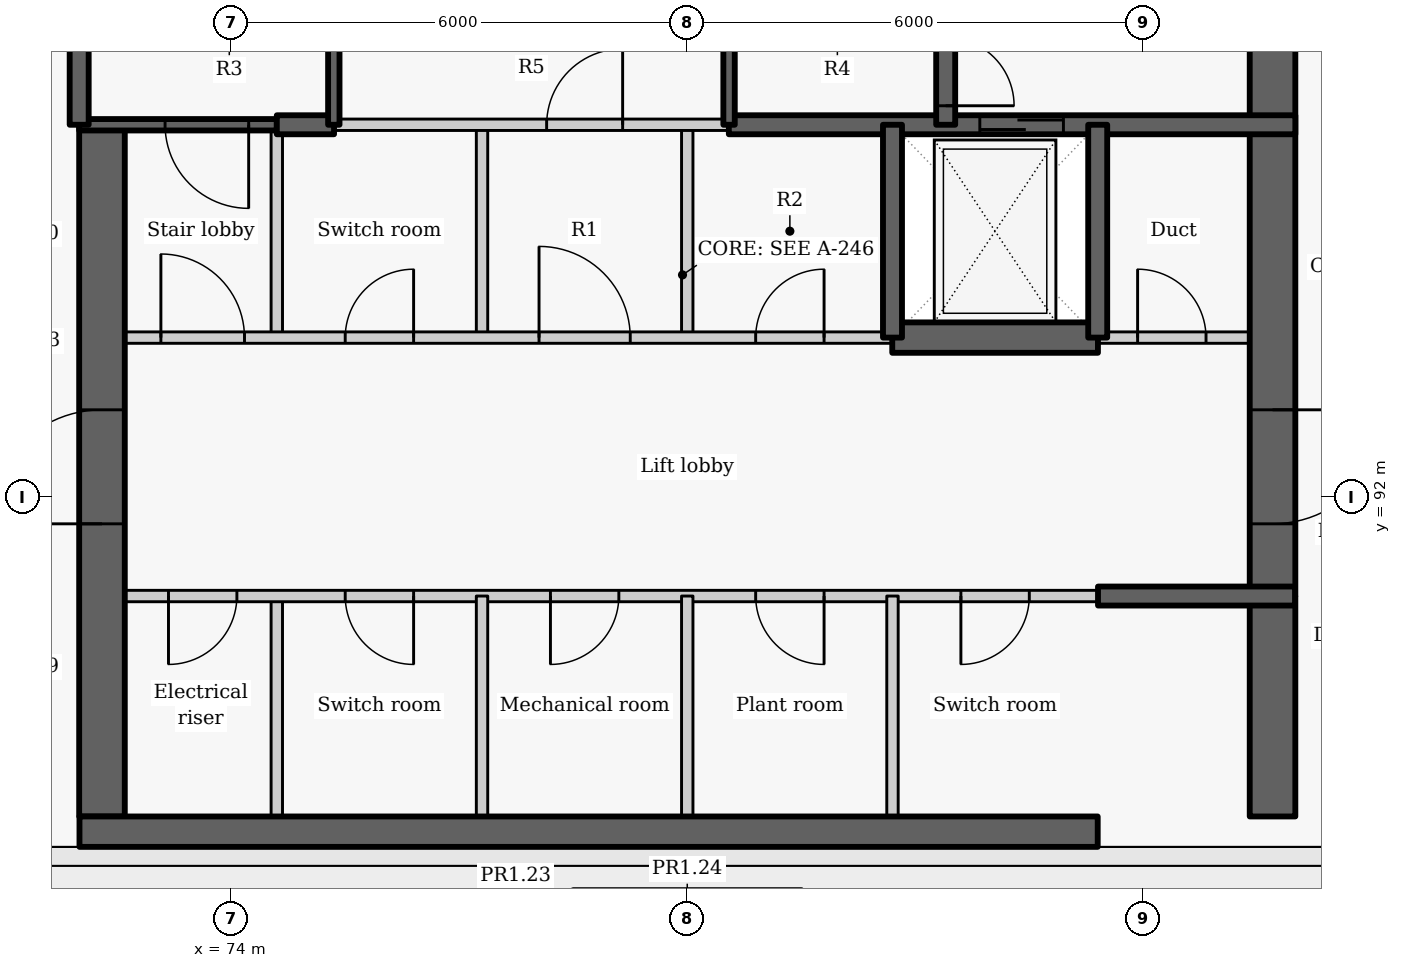
"""IFC4 building model, lengths in metres.
Left out: names, types, materials, properties, quantities, classifications, styles, units other than length and angle.
Written with IfcOpenShell. Run it as: python <this file> out.ifc"""

import sys

from ifc_helpers import new_model, si_unit, direction, frame, frame_2d, origin, place, context, subcontext, project, spatial, rectangle, extrude, element, fill, save


model = new_model("IFC4")
c1 = context("Model", 3, precision=1e-05, world=origin(), true_north=direction((0.0, 1.0)))
c2 = subcontext(c1, "Body", "Model", "MODEL_VIEW")
j1 = project(units=[si_unit("LENGTHUNIT", "METRE"), si_unit("PLANEANGLEUNIT", "RADIAN")], contexts=[c1])
p1 = place(None, origin())
s1 = spatial("IfcSite", under=j1, at=p1, CompositionType="ELEMENT")
p2 = place(p1, origin())
s2 = spatial("IfcBuilding", under=s1, at=p2, CompositionType="ELEMENT")
p3 = place(p2, frame((0.0, 0.0, 276.0)))
s3 = spatial("IfcBuildingStorey", under=s2, at=p3, CompositionType="ELEMENT", Elevation=276.0)
p4 = place(p3, frame((74.6, 87.8, 0.0), z_axis=(0.0, 0.0, 1.0), x_axis=(0.0, 1.0, 0.0)))
e1 = element("IfcWall", 1, at=p4, inside=s3, PredefinedType="PARTITIONING", context=c2, shape_type="SweptSolid", body=[
    extrude(rectangle(XDim=2.9, YDim=0.15, at=frame_2d((1.45, 0.0))), origin(), (0.0, 0.0, 1.0), 3.325),
])
p5 = place(p3, frame((74.6, 94.1, 0.0), z_axis=(0.0, 0.0, 1.0), x_axis=(0.0, 1.0, 0.0)))
e2 = element("IfcWall", 2, at=p5, inside=s3, PredefinedType="PARTITIONING", context=c2, shape_type="SweptSolid", body=[
    extrude(rectangle(XDim=2.8, YDim=0.15, at=frame_2d((1.4, 0.0))), origin(), (0.0, 0.0, 1.0), 3.325),
])
p6 = place(p3, frame((85.4, 90.7, 0.0), z_axis=(0.0, 0.0, 1.0), x_axis=(-1.0, 0.0, 0.0)))
e3 = element("IfcWall", 3, at=p6, inside=s3, PredefinedType="PARTITIONING", context=c2, shape_type="SweptSolid", body=[
    extrude(rectangle(XDim=13.4, YDim=0.15, at=frame_2d((6.7, 0.0))), origin(), (0.0, 0.0, 1.0), 3.325),
])
p7 = place(p6, frame((11.325, 0.0, 0.0)))
e4 = element("IfcOpeningElement", 4, at=p7, cuts=e3, PredefinedType="OPENING", context=c2, shape_type="SweptSolid", body=[
    extrude(rectangle(XDim=0.9, YDim=2.1, at=frame_2d((0.45, 1.05))), frame((0.0, 0.085, 0.0), z_axis=(0.0, -1.0, 0.0), x_axis=(1.0, 0.0, 0.0)), (0.0, 0.0, 1.0), 0.17),
])
p8 = place(p6, frame((9.0, 0.0, 0.0)))
e5 = element("IfcOpeningElement", 5, at=p8, cuts=e3, PredefinedType="OPENING", context=c2, shape_type="SweptSolid", body=[
    extrude(rectangle(XDim=0.9, YDim=2.1, at=frame_2d((0.45, 1.05))), frame((0.0, 0.085, 0.0), z_axis=(0.0, -1.0, 0.0), x_axis=(1.0, 0.0, 0.0)), (0.0, 0.0, 1.0), 0.17),
])
p9 = place(p6, frame((6.3, 0.0, 0.0)))
e6 = element("IfcOpeningElement", 6, at=p9, cuts=e3, PredefinedType="OPENING", context=c2, shape_type="SweptSolid", body=[
    extrude(rectangle(XDim=0.9, YDim=2.1, at=frame_2d((0.45, 1.05))), frame((0.0, 0.085, 0.0), z_axis=(0.0, -1.0, 0.0), x_axis=(1.0, 0.0, 0.0)), (0.0, 0.0, 1.0), 0.17),
])
p10 = place(p6, frame((3.6, 0.0, 0.0)))
e7 = element("IfcOpeningElement", 7, at=p10, cuts=e3, PredefinedType="OPENING", context=c2, shape_type="SweptSolid", body=[
    extrude(rectangle(XDim=0.9, YDim=2.1, at=frame_2d((0.45, 1.05))), frame((0.0, 0.085, 0.0), z_axis=(0.0, -1.0, 0.0), x_axis=(1.0, 0.0, 0.0)), (0.0, 0.0, 1.0), 0.17),
])
p11 = place(p6, frame((0.9, 0.0, 0.0)))
e8 = element("IfcOpeningElement", 8, at=p11, cuts=e3, PredefinedType="OPENING", context=c2, shape_type="SweptSolid", body=[
    extrude(rectangle(XDim=0.9, YDim=2.1, at=frame_2d((0.45, 1.05))), frame((0.0, 0.085, 0.0), z_axis=(0.0, -1.0, 0.0), x_axis=(1.0, 0.0, 0.0)), (0.0, 0.0, 1.0), 0.17),
])
p12 = place(p3, frame((72.3, 87.8, -0.275), z_axis=(0.0, 0.0, 1.0), x_axis=(0.0, 1.0, 0.0)))
e9 = element("IfcWall", 9, at=p12, inside=s3, PredefinedType="SHEAR", context=c2, shape_type="SweptSolid", body=[
    extrude(rectangle(XDim=9.1, YDim=0.6, at=frame_2d((4.55, 0.0))), origin(), (0.0, 0.0, 1.0), 3.6),
])
p13 = place(p12, frame((3.85, 0.0, 0.275)))
e10 = element("IfcOpeningElement", 10, at=p13, cuts=e9, PredefinedType="OPENING", context=c2, shape_type="SweptSolid", body=[
    extrude(rectangle(XDim=1.5, YDim=2.1, at=frame_2d((0.75, 1.05))), frame((0.0, 0.31, 0.0), z_axis=(0.0, -1.0, 0.0), x_axis=(1.0, 0.0, 0.0)), (0.0, 0.0, 1.0), 0.62),
])
p14 = place(p3, frame((77.3, 87.8, 0.0), z_axis=(0.0, 0.0, 1.0), x_axis=(0.0, 1.0, 0.0)))
e11 = element("IfcWall", 11, at=p14, inside=s3, PredefinedType="PARTITIONING", context=c2, shape_type="SweptSolid", body=[
    extrude(rectangle(XDim=2.9, YDim=0.15, at=frame_2d((1.45, 0.0))), origin(), (0.0, 0.0, 1.0), 3.325),
])
p15 = place(p3, frame((77.3, 94.1, 0.0), z_axis=(0.0, 0.0, 1.0), x_axis=(0.0, 1.0, 0.0)))
e12 = element("IfcWall", 12, at=p15, inside=s3, PredefinedType="PARTITIONING", context=c2, shape_type="SweptSolid", body=[
    extrude(rectangle(XDim=2.8, YDim=0.15, at=frame_2d((1.4, 0.0))), origin(), (0.0, 0.0, 1.0), 3.325),
])
p16 = place(p3, frame((80.0, 87.8, 0.0), z_axis=(0.0, 0.0, 1.0), x_axis=(0.0, 1.0, 0.0)))
e13 = element("IfcWall", 13, at=p16, inside=s3, PredefinedType="PARTITIONING", context=c2, shape_type="SweptSolid", body=[
    extrude(rectangle(XDim=2.9, YDim=0.15, at=frame_2d((1.45, 0.0))), origin(), (0.0, 0.0, 1.0), 3.325),
])
p17 = place(p3, frame((80.0, 94.1, 0.0), z_axis=(0.0, 0.0, 1.0), x_axis=(0.0, 1.0, 0.0)))
e14 = element("IfcWall", 14, at=p17, inside=s3, PredefinedType="PARTITIONING", context=c2, shape_type="SweptSolid", body=[
    extrude(rectangle(XDim=2.8, YDim=0.15, at=frame_2d((1.4, 0.0))), origin(), (0.0, 0.0, 1.0), 3.325),
])
p18 = place(p3, frame((82.7, 87.8, 0.0), z_axis=(0.0, 0.0, 1.0), x_axis=(0.0, 1.0, 0.0)))
e15 = element("IfcWall", 15, at=p18, inside=s3, PredefinedType="PARTITIONING", context=c2, shape_type="SweptSolid", body=[
    extrude(rectangle(XDim=2.9, YDim=0.15, at=frame_2d((1.45, 0.0))), origin(), (0.0, 0.0, 1.0), 3.325),
])
p19 = place(p3, frame((72.0, 94.1, 0.0), z_axis=(0.0, 0.0, 1.0), x_axis=(1.0, 0.0, 0.0)))
e16 = element("IfcWall", 16, at=p19, inside=s3, PredefinedType="PARTITIONING", context=c2, shape_type="SweptSolid", body=[
    extrude(rectangle(XDim=10.703, YDim=0.15, at=frame_2d((5.352, 0.0))), origin(), (0.0, 0.0, 1.0), 3.325),
])
p20 = place(p19, frame((1.075, 0.0, 0.0)))
e17 = element("IfcOpeningElement", 17, at=p20, cuts=e16, PredefinedType="OPENING", context=c2, shape_type="SweptSolid", body=[
    extrude(rectangle(XDim=1.1, YDim=2.1, at=frame_2d((0.55, 1.05))), frame((0.0, 0.085, 0.0), z_axis=(0.0, -1.0, 0.0), x_axis=(1.0, 0.0, 0.0)), (0.0, 0.0, 1.0), 0.17),
])
p21 = place(p19, frame((3.5, 0.0, 0.0)))
e18 = element("IfcOpeningElement", 18, at=p21, cuts=e16, PredefinedType="OPENING", context=c2, shape_type="SweptSolid", body=[
    extrude(rectangle(XDim=0.9, YDim=2.1, at=frame_2d((0.45, 1.05))), frame((0.0, 0.085, 0.0), z_axis=(0.0, -1.0, 0.0), x_axis=(1.0, 0.0, 0.0)), (0.0, 0.0, 1.0), 0.17),
])
p22 = place(p19, frame((6.05, 0.0, 0.0)))
e19 = element("IfcOpeningElement", 19, at=p22, cuts=e16, PredefinedType="OPENING", context=c2, shape_type="SweptSolid", body=[
    extrude(rectangle(XDim=1.2, YDim=2.1, at=frame_2d((0.6, 1.05))), frame((0.0, 0.085, 0.0), z_axis=(0.0, -1.0, 0.0), x_axis=(1.0, 0.0, 0.0)), (0.0, 0.0, 1.0), 0.17),
])
p23 = place(p19, frame((8.9, 0.0, 0.0)))
e20 = element("IfcOpeningElement", 20, at=p23, cuts=e16, PredefinedType="OPENING", context=c2, shape_type="SweptSolid", body=[
    extrude(rectangle(XDim=0.9, YDim=2.1, at=frame_2d((0.45, 1.05))), frame((0.0, 0.085, 0.0), z_axis=(0.0, -1.0, 0.0), x_axis=(1.0, 0.0, 0.0)), (0.0, 0.0, 1.0), 0.17),
])
p24 = place(p3, frame((85.397, 94.1, 0.0), z_axis=(0.0, 0.0, 1.0), x_axis=(1.0, 0.0, 0.0)))
e21 = element("IfcWall", 21, at=p24, inside=s3, PredefinedType="PARTITIONING", context=c2, shape_type="SweptSolid", body=[
    extrude(rectangle(XDim=2.603, YDim=0.15, at=frame_2d((1.302, 0.0))), origin(), (0.0, 0.0, 1.0), 3.325),
])
p25 = place(p24, frame((0.528, 0.0, 0.0)))
e22 = element("IfcOpeningElement", 22, at=p25, cuts=e21, PredefinedType="OPENING", context=c2, shape_type="SweptSolid", body=[
    extrude(rectangle(XDim=0.9, YDim=2.1, at=frame_2d((0.45, 1.05))), frame((0.0, 0.085, 0.0), z_axis=(0.0, -1.0, 0.0), x_axis=(1.0, 0.0, 0.0)), (0.0, 0.0, 1.0), 0.17),
])
p26 = place(p3, frame((82.697, 94.1, -0.275), z_axis=(0.0, 0.0, 1.0), x_axis=(1.0, 0.0, 0.0)))
e23 = element("IfcWall", 23, at=p26, inside=s3, PredefinedType="SHEAR", context=c2, shape_type="SweptSolid", body=[
    extrude(rectangle(XDim=2.706, YDim=0.4, at=frame_2d((1.353, 0.0))), origin(), (0.0, 0.0, 1.0), 3.6),
])
p27 = place(p3, frame((87.7, 102.05, -0.275), z_axis=(0.0, 0.0, 1.0), x_axis=(0.0, -1.0, 0.0)))
e24 = element("IfcWall", 24, at=p27, inside=s3, PredefinedType="SHEAR", context=c2, shape_type="SweptSolid", body=[
    extrude(rectangle(XDim=11.35, YDim=0.6, at=frame_2d((5.675, 0.0))), origin(), (0.0, 0.0, 1.0), 3.6),
])
p28 = place(p27, frame((8.9, 0.0, 0.275)))
e25 = element("IfcOpeningElement", 25, at=p28, cuts=e24, PredefinedType="OPENING", context=c2, shape_type="SweptSolid", body=[
    extrude(rectangle(XDim=1.5, YDim=2.1, at=frame_2d((0.75, 1.05))), frame((0.0, 0.31, 0.0), z_axis=(0.0, -1.0, 0.0), x_axis=(1.0, 0.0, 0.0)), (0.0, 0.0, 1.0), 0.62),
])
p29 = place(p27, frame((2.025, 0.0, 0.275)))
e26 = element("IfcOpeningElement", 26, at=p29, cuts=e24, PredefinedType="OPENING", context=c2, shape_type="SweptSolid", body=[
    extrude(rectangle(XDim=1.1, YDim=2.1, at=frame_2d((0.55, 1.05))), frame((0.0, 0.31, 0.0), z_axis=(0.0, -1.0, 0.0), x_axis=(1.0, 0.0, 0.0)), (0.0, 0.0, 1.0), 0.62),
])
p30 = place(p3, frame((74.6, 96.9, -0.275), z_axis=(0.0, 0.0, 1.0), x_axis=(-1.0, 0.0, 0.0)))
e27 = element("IfcWall", 27, at=p30, inside=s3, PredefinedType="SHEAR", context=c2, shape_type="SweptSolid", body=[
    extrude(rectangle(XDim=2.6, YDim=0.15, at=frame_2d((1.3, 0.0))), origin(), (0.0, 0.0, 1.0), 3.6),
])
p31 = place(p30, frame((0.37, 0.0, 0.275)))
e28 = element("IfcOpeningElement", 28, at=p31, cuts=e27, PredefinedType="OPENING", context=c2, shape_type="SweptSolid", body=[
    extrude(rectangle(XDim=1.1, YDim=2.1, at=frame_2d((0.55, 1.05))), frame((0.0, 0.085, 0.0), z_axis=(0.0, -1.0, 0.0), x_axis=(1.0, 0.0, 0.0)), (0.0, 0.0, 1.0), 0.17),
])
p32 = place(p3, frame((74.6, 96.9, -0.275), z_axis=(0.0, 0.0, 1.0), x_axis=(1.0, 0.0, 0.0)))
e29 = element("IfcWall", 29, at=p32, inside=s3, PredefinedType="SHEAR", context=c2, shape_type="SweptSolid", body=[
    extrude(rectangle(XDim=0.753, YDim=0.25, at=frame_2d((0.376, 0.0))), origin(), (0.0, 0.0, 1.0), 3.6),
])
p33 = place(p3, frame((80.547, 96.9, -0.275), z_axis=(0.0, 0.0, 1.0), x_axis=(1.0, 0.0, 0.0)))
e30 = element("IfcWall", 30, at=p33, inside=s3, PredefinedType="SHEAR", context=c2, shape_type="SweptSolid", body=[
    extrude(rectangle(XDim=7.453, YDim=0.25, at=frame_2d((3.727, 0.0))), origin(), (0.0, 0.0, 1.0), 3.6),
])
p34 = place(p33, frame((3.302, 0.0, 0.275)))
e31 = element("IfcOpeningElement", 31, at=p34, cuts=e30, PredefinedType="OPENING", context=c2, shape_type="SweptSolid", body=[
    extrude(rectangle(XDim=1.1, YDim=2.1, at=frame_2d((0.55, 1.05))), frame((0.0, 0.135, 0.0), z_axis=(0.0, -1.0, 0.0), x_axis=(1.0, 0.0, 0.0)), (0.0, 0.0, 1.0), 0.27),
])
p35 = place(p3, frame((75.347, 96.9, 0.0), z_axis=(0.0, 0.0, 1.0), x_axis=(1.0, 0.0, 0.0)))
e32 = element("IfcWall", 32, at=p35, inside=s3, PredefinedType="PARTITIONING", context=c2, shape_type="SweptSolid", body=[
    extrude(rectangle(XDim=5.206, YDim=0.15, at=frame_2d((2.603, 0.0))), origin(), (0.0, 0.0, 1.0), 3.325),
])
p36 = place(p35, frame((2.803, 0.0, 0.0)))
e33 = element("IfcOpeningElement", 33, at=p36, cuts=e32, PredefinedType="OPENING", context=c2, shape_type="SweptSolid", body=[
    extrude(rectangle(XDim=1.0, YDim=2.1, at=frame_2d((0.5, 1.05))), frame((0.0, 0.085, 0.0), z_axis=(0.0, -1.0, 0.0), x_axis=(1.0, 0.0, 0.0)), (0.0, 0.0, 1.0), 0.17),
])
for number, where, z_axis, x_axis in (
    (34, (82.7, 94.1, -0.275), (0.0, 0.0, 1.0), (0.0, 1.0, 0.0)),
    (35, (85.4, 94.1, -0.275), (0.0, 0.0, 1.0), (0.0, 1.0, 0.0)),
):
    element("IfcWall", number, at=place(p3, frame(where, z_axis=z_axis, x_axis=x_axis)), inside=s3, PredefinedType="SHEAR", context=c2, shape_type="SweptSolid", body=[
        extrude(rectangle(XDim=2.8, YDim=0.25, at=frame_2d((1.4, 0.0))), origin(), (0.0, 0.0, 1.0), 3.6),
    ])
p37 = place(p3, frame((75.35, 96.9, -0.275), z_axis=(0.0, 0.0, 1.0), x_axis=(0.0, 1.0, 0.0)))
e36 = element("IfcWall", 36, at=p37, inside=s3, PredefinedType="SHEAR", context=c2, shape_type="SweptSolid", body=[
    extrude(rectangle(XDim=1.503, YDim=0.15, at=frame_2d((0.751, 0.0))), origin(), (0.0, 0.0, 1.0), 3.6),
])
p38 = place(p3, frame((72.0, 96.9, -0.275), z_axis=(0.0, 0.0, 1.0), x_axis=(0.0, 1.0, 0.0)))
e37 = element("IfcWall", 37, at=p38, inside=s3, PredefinedType="SHEAR", context=c2, shape_type="SweptSolid", body=[
    extrude(rectangle(XDim=5.15, YDim=0.25, at=frame_2d((2.575, 0.0))), origin(), (0.0, 0.0, 1.0), 3.6),
])
p39 = place(p3, frame((83.4, 102.05, -0.275), z_axis=(0.0, 0.0, 1.0), x_axis=(0.0, -1.0, 0.0)))
e38 = element("IfcWall", 38, at=p39, inside=s3, PredefinedType="SHEAR", context=c2, shape_type="SweptSolid", body=[
    extrude(rectangle(XDim=5.15, YDim=0.25, at=frame_2d((2.575, 0.0))), origin(), (0.0, 0.0, 1.0), 3.6),
])
p40 = place(p39, frame((4.0, 0.0, 0.275)))
e39 = element("IfcOpeningElement", 39, at=p40, cuts=e38, PredefinedType="OPENING", context=c2, shape_type="SweptSolid", body=[
    extrude(rectangle(XDim=0.9, YDim=2.1, at=frame_2d((0.45, 1.05))), frame((0.0, 0.135, 0.0), z_axis=(0.0, -1.0, 0.0), x_axis=(1.0, 0.0, 0.0)), (0.0, 0.0, 1.0), 0.27),
])
p41 = place(p3, frame((80.55, 96.9, -0.275), z_axis=(0.0, 0.0, 1.0), x_axis=(0.0, 1.0, 0.0)))
e40 = element("IfcWall", 40, at=p41, inside=s3, PredefinedType="SHEAR", context=c2, shape_type="SweptSolid", body=[
    extrude(rectangle(XDim=1.503, YDim=0.15, at=frame_2d((0.751, 0.0))), origin(), (0.0, 0.0, 1.0), 3.6),
])
p42 = place(p3, frame((72.004, 87.6, -0.275), z_axis=(0.0, 0.0, 1.0), x_axis=(1.0, 0.0, 0.0)))
e41 = element("IfcWall", 41, at=p42, inside=s3, PredefinedType="SHEAR", context=c2, shape_type="SweptSolid", body=[
    extrude(rectangle(XDim=13.396, YDim=0.4, at=frame_2d((6.698, 0.0))), origin(), (0.0, 0.0, 1.0), 3.6),
])
p43 = place(p3, frame((87.7, 87.8, -0.275), z_axis=(0.0, 0.0, 1.0), x_axis=(0.0, 1.0, 0.0)))
e42 = element("IfcWall", 42, at=p43, inside=s3, PredefinedType="SHEAR", context=c2, shape_type="SweptSolid", body=[
    extrude(rectangle(XDim=2.896, YDim=0.6, at=frame_2d((1.448, 0.0))), origin(), (0.0, 0.0, 1.0), 3.6),
])
p44 = place(p3, frame((85.404, 90.7, -0.275), z_axis=(0.0, 0.0, 1.0), x_axis=(1.0, 0.0, 0.0)))
e43 = element("IfcWall", 43, at=p44, inside=s3, PredefinedType="SHEAR", context=c2, shape_type="SweptSolid", body=[
    extrude(rectangle(XDim=2.592, YDim=0.25, at=frame_2d((1.296, 0.0))), origin(), (0.0, 0.0, 1.0), 3.6),
])
p45 = place(p7, origin())
e44 = element("IfcDoor", 44, at=p45, inside=s3, OperationType="SINGLE_SWING_RIGHT", PredefinedType="DOOR", context=c2, shape_type="SweptSolid", body=[
    extrude(rectangle(XDim=0.9, YDim=2.1, at=frame_2d((0.45, 1.05))), frame((0.0, 0.025, 0.0), z_axis=(0.0, -1.0, 0.0), x_axis=(1.0, 0.0, 0.0)), (0.0, 0.0, 1.0), 0.05),
])
fill(e4, e44)
p46 = place(p8, origin())
e45 = element("IfcDoor", 45, at=p46, inside=s3, OperationType="SINGLE_SWING_LEFT", PredefinedType="DOOR", context=c2, shape_type="SweptSolid", body=[
    extrude(rectangle(XDim=0.9, YDim=2.1, at=frame_2d((0.45, 1.05))), frame((0.0, 0.025, 0.0), z_axis=(0.0, -1.0, 0.0), x_axis=(1.0, 0.0, 0.0)), (0.0, 0.0, 1.0), 0.05),
])
fill(e5, e45)
p47 = place(p9, origin())
e46 = element("IfcDoor", 46, at=p47, inside=s3, OperationType="SINGLE_SWING_RIGHT", PredefinedType="DOOR", context=c2, shape_type="SweptSolid", body=[
    extrude(rectangle(XDim=0.9, YDim=2.1, at=frame_2d((0.45, 1.05))), frame((0.0, 0.025, 0.0), z_axis=(0.0, -1.0, 0.0), x_axis=(1.0, 0.0, 0.0)), (0.0, 0.0, 1.0), 0.05),
])
fill(e6, e46)
p48 = place(p10, origin())
e47 = element("IfcDoor", 47, at=p48, inside=s3, OperationType="SINGLE_SWING_LEFT", PredefinedType="DOOR", context=c2, shape_type="SweptSolid", body=[
    extrude(rectangle(XDim=0.9, YDim=2.1, at=frame_2d((0.45, 1.05))), frame((0.0, 0.025, 0.0), z_axis=(0.0, -1.0, 0.0), x_axis=(1.0, 0.0, 0.0)), (0.0, 0.0, 1.0), 0.05),
])
fill(e7, e47)
p49 = place(p11, origin())
e48 = element("IfcDoor", 48, at=p49, inside=s3, OperationType="SINGLE_SWING_RIGHT", PredefinedType="DOOR", context=c2, shape_type="SweptSolid", body=[
    extrude(rectangle(XDim=0.9, YDim=2.1, at=frame_2d((0.45, 1.05))), frame((0.0, 0.025, 0.0), z_axis=(0.0, -1.0, 0.0), x_axis=(1.0, 0.0, 0.0)), (0.0, 0.0, 1.0), 0.05),
])
fill(e8, e48)
p50 = place(p20, origin())
e49 = element("IfcDoor", 49, at=p50, inside=s3, OperationType="SINGLE_SWING_LEFT", PredefinedType="DOOR", context=c2, shape_type="SweptSolid", body=[
    extrude(rectangle(XDim=1.1, YDim=2.1, at=frame_2d((0.55, 1.05))), frame((0.0, 0.025, 0.0), z_axis=(0.0, -1.0, 0.0), x_axis=(1.0, 0.0, 0.0)), (0.0, 0.0, 1.0), 0.05),
])
fill(e17, e49)
p51 = place(p21, origin())
e50 = element("IfcDoor", 50, at=p51, inside=s3, OperationType="SINGLE_SWING_RIGHT", PredefinedType="DOOR", context=c2, shape_type="SweptSolid", body=[
    extrude(rectangle(XDim=0.9, YDim=2.1, at=frame_2d((0.45, 1.05))), frame((0.0, 0.025, 0.0), z_axis=(0.0, -1.0, 0.0), x_axis=(1.0, 0.0, 0.0)), (0.0, 0.0, 1.0), 0.05),
])
fill(e18, e50)
p52 = place(p22, origin())
e51 = element("IfcDoor", 51, at=p52, inside=s3, OperationType="DOUBLE_DOOR_SINGLE_SWING", PredefinedType="DOOR", context=c2, shape_type="SweptSolid", body=[
    extrude(rectangle(XDim=1.2, YDim=2.1, at=frame_2d((0.6, 1.05))), frame((0.0, 0.025, 0.0), z_axis=(0.0, -1.0, 0.0), x_axis=(1.0, 0.0, 0.0)), (0.0, 0.0, 1.0), 0.05),
])
fill(e19, e51)
p53 = place(p23, origin())
e52 = element("IfcDoor", 52, at=p53, inside=s3, OperationType="SINGLE_SWING_RIGHT", PredefinedType="DOOR", context=c2, shape_type="SweptSolid", body=[
    extrude(rectangle(XDim=0.9, YDim=2.1, at=frame_2d((0.45, 1.05))), frame((0.0, 0.025, 0.0), z_axis=(0.0, -1.0, 0.0), x_axis=(1.0, 0.0, 0.0)), (0.0, 0.0, 1.0), 0.05),
])
fill(e20, e52)
p54 = place(p34, origin())
e53 = element("IfcDoor", 53, at=p54, inside=s3, OperationType="SLIDING_TO_LEFT", PredefinedType="DOOR", context=c2, shape_type="SweptSolid", body=[
    extrude(rectangle(XDim=1.1, YDim=2.1, at=frame_2d((0.55, 1.05))), frame((0.0, 0.025, 0.0), z_axis=(0.0, -1.0, 0.0), x_axis=(1.0, 0.0, 0.0)), (0.0, 0.0, 1.0), 0.05),
])
fill(e31, e53)
p55 = place(p25, origin())
e54 = element("IfcDoor", 54, at=p55, inside=s3, OperationType="SINGLE_SWING_LEFT", PredefinedType="DOOR", context=c2, shape_type="SweptSolid", body=[
    extrude(rectangle(XDim=0.9, YDim=2.1, at=frame_2d((0.45, 1.05))), frame((0.0, 0.025, 0.0), z_axis=(0.0, -1.0, 0.0), x_axis=(1.0, 0.0, 0.0)), (0.0, 0.0, 1.0), 0.05),
])
fill(e22, e54)
p56 = place(p36, origin())
e55 = element("IfcDoor", 55, at=p56, inside=s3, OperationType="SINGLE_SWING_RIGHT", PredefinedType="DOOR", context=c2, shape_type="SweptSolid", body=[
    extrude(rectangle(XDim=1.0, YDim=2.1, at=frame_2d((0.5, 1.05))), frame((0.0, 0.025, 0.0), z_axis=(0.0, -1.0, 0.0), x_axis=(1.0, 0.0, 0.0)), (0.0, 0.0, 1.0), 0.05),
])
fill(e33, e55)
p57 = place(p31, origin())
e56 = element("IfcDoor", 56, at=p57, inside=s3, OperationType="SINGLE_SWING_LEFT", PredefinedType="DOOR", context=c2, shape_type="SweptSolid", body=[
    extrude(rectangle(XDim=1.1, YDim=2.1, at=frame_2d((0.55, 1.05))), frame((0.0, 0.025, 0.0), z_axis=(0.0, -1.0, 0.0), x_axis=(1.0, 0.0, 0.0)), (0.0, 0.0, 1.0), 0.05),
])
fill(e28, e56)
p58 = place(p40, origin())
e57 = element("IfcDoor", 57, at=p58, inside=s3, OperationType="SINGLE_SWING_RIGHT", PredefinedType="DOOR", context=c2, shape_type="SweptSolid", body=[
    extrude(rectangle(XDim=0.9, YDim=2.1, at=frame_2d((0.45, 1.05))), frame((0.0, 0.025, 0.0), z_axis=(0.0, -1.0, 0.0), x_axis=(1.0, 0.0, 0.0)), (0.0, 0.0, 1.0), 0.05),
])
fill(e39, e57)
p59 = place(p28, origin())
e58 = element("IfcDoor", 58, at=p59, inside=s3, OperationType="DOUBLE_DOOR_SINGLE_SWING", PredefinedType="DOOR", context=c2, shape_type="SweptSolid", body=[
    extrude(rectangle(XDim=1.5, YDim=2.1, at=frame_2d((0.75, 1.05))), frame((0.0, 0.025, 0.0), z_axis=(0.0, -1.0, 0.0), x_axis=(1.0, 0.0, 0.0)), (0.0, 0.0, 1.0), 0.05),
])
fill(e25, e58)
p60 = place(p13, origin())
e59 = element("IfcDoor", 59, at=p60, inside=s3, OperationType="DOUBLE_DOOR_SINGLE_SWING", PredefinedType="DOOR", context=c2, shape_type="SweptSolid", body=[
    extrude(rectangle(XDim=1.5, YDim=2.1, at=frame_2d((0.75, 1.05))), frame((0.0, 0.025, 0.0), z_axis=(0.0, -1.0, 0.0), x_axis=(1.0, 0.0, 0.0)), (0.0, 0.0, 1.0), 0.05),
])
fill(e10, e59)
save(model, sys.argv[1])
